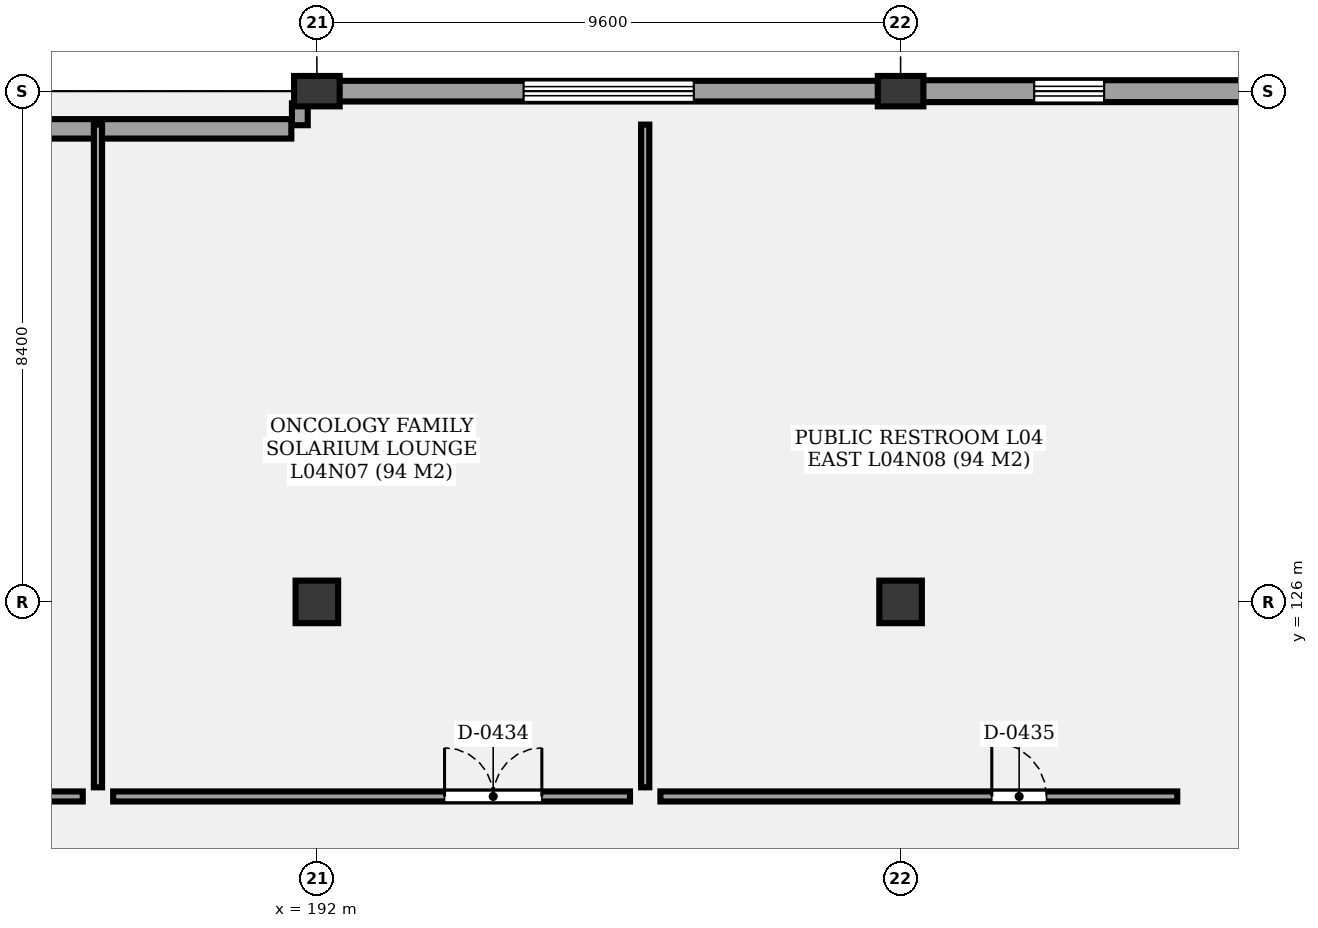
"""IFC4 building model, lengths in metres.
Left out: names, types, materials, properties, quantities, classifications, styles, units other than length and angle.
Written with IfcOpenShell. Run it as: python <this file> out.ifc"""

import sys

from ifc_helpers import new_model, si_unit, direction, frame, frame_2d, origin, origin_2d, place, context, subcontext, project, spatial, rectangle, extrude, element, fill, save


model = new_model("IFC4")
c1 = context("Model", 3, precision=1e-05, world=origin(), true_north=direction((0.0, 1.0)))
c2 = subcontext(c1, "Body", "Model", "MODEL_VIEW")
j1 = project(units=[si_unit("LENGTHUNIT", "METRE"), si_unit("PLANEANGLEUNIT", "RADIAN")], contexts=[c1])
p1 = place(None, origin())
s1 = spatial("IfcSite", under=j1, at=p1, CompositionType="ELEMENT")
p2 = place(p1, origin())
s2 = spatial("IfcBuilding", under=s1, at=p2, CompositionType="ELEMENT")
p3 = place(p2, frame((0.0, 0.0, 17.8)))
s3 = spatial("IfcBuildingStorey", under=s2, at=p3, CompositionType="ELEMENT", Elevation=17.8)
p4 = place(p3, frame((192.0, 126.0, 0.0), z_axis=(0.0, 0.0, 1.0), x_axis=(1.0, 0.0, 0.0)))
e1 = element("IfcColumn", 1, at=p4, inside=s3, PredefinedType="COLUMN", context=c2, shape_type="SweptSolid", body=[
    extrude(rectangle(XDim=0.7, YDim=0.7, at=origin_2d()), origin(), (0.0, 0.0, 1.0), 4.2),
])
p5 = place(p3, frame((192.0, 134.4, 0.0), z_axis=(0.0, 0.0, 1.0), x_axis=(1.0, 0.0, 0.0)))
e2 = element("IfcColumn", 2, at=p5, inside=s3, PredefinedType="COLUMN", context=c2, shape_type="SweptSolid", body=[
    extrude(rectangle(XDim=0.75, YDim=0.5, at=origin_2d()), origin(), (0.0, 0.0, 1.0), 4.2),
])
p6 = place(p3, frame((201.6, 126.0, 0.0), z_axis=(0.0, 0.0, 1.0), x_axis=(1.0, 0.0, 0.0)))
e3 = element("IfcColumn", 3, at=p6, inside=s3, PredefinedType="COLUMN", context=c2, shape_type="SweptSolid", body=[
    extrude(rectangle(XDim=0.7, YDim=0.7, at=origin_2d()), origin(), (0.0, 0.0, 1.0), 4.2),
])
p7 = place(p3, frame((201.6, 134.4, 0.0), z_axis=(0.0, 0.0, 1.0), x_axis=(1.0, 0.0, 0.0)))
e4 = element("IfcColumn", 4, at=p7, inside=s3, PredefinedType="COLUMN", context=c2, shape_type="SweptSolid", body=[
    extrude(rectangle(XDim=0.75, YDim=0.5, at=origin_2d()), origin(), (0.0, 0.0, 1.0), 4.2),
])
p8 = place(p3, frame((191.72, 134.2, 0.0), z_axis=(0.0, 0.0, 1.0), x_axis=(0.0, -1.0, 0.0)))
e5 = element("IfcWall", 5, at=p8, inside=s3, PredefinedType="SOLIDWALL", context=c2, shape_type="SweptSolid", body=[
    extrude(rectangle(XDim=0.36, YDim=0.26, at=frame_2d((0.18, 0.0))), origin(), (0.0, 0.0, 1.0), 3.39),
])
p9 = place(p3, frame((182.82, 133.78, 0.0), z_axis=(0.0, 0.0, 1.0), x_axis=(1.0, 0.0, 0.0)))
e6 = element("IfcWall", 6, at=p9, inside=s3, PredefinedType="SOLIDWALL", context=c2, shape_type="SweptSolid", body=[
    extrude(rectangle(XDim=8.76, YDim=0.32, at=frame_2d((4.38, 0.0))), origin(), (0.0, 0.0, 1.0), 3.39),
])
p10 = place(p3, frame((192.0, 134.4, 0.0), z_axis=(0.0, 0.0, 1.0), x_axis=(1.0, 0.0, 0.0)))
e7 = element("IfcWall", 7, at=p10, inside=s3, PredefinedType="SOLIDWALL", context=c2, shape_type="SweptSolid", body=[
    extrude(rectangle(XDim=9.6, YDim=0.34, at=frame_2d((4.8, 0.0))), origin(), (0.0, 0.0, 1.0), 3.39),
])
p11 = place(p10, frame((3.4, 0.0, 0.85)))
e8 = element("IfcOpeningElement", 8, at=p11, cuts=e7, PredefinedType="OPENING", context=c2, shape_type="SweptSolid", body=[
    extrude(rectangle(XDim=2.8, YDim=1.2, at=frame_2d((1.4, 0.6))), frame((0.0, 0.18, 0.0), z_axis=(0.0, -1.0, 0.0), x_axis=(1.0, 0.0, 0.0)), (0.0, 0.0, 1.0), 0.36),
])
p12 = place(p3, frame((201.6, 134.4, 0.0), z_axis=(0.0, 0.0, 1.0), x_axis=(1.0, 0.0, 0.0)))
e9 = element("IfcWall", 9, at=p12, inside=s3, PredefinedType="SOLIDWALL", context=c2, shape_type="SweptSolid", body=[
    extrude(rectangle(XDim=9.6, YDim=0.36, at=frame_2d((4.8, 0.0))), origin(), (0.0, 0.0, 1.0), 3.39),
])
p13 = place(p12, frame((2.197, 0.0, 0.85)))
e10 = element("IfcOpeningElement", 10, at=p13, cuts=e9, PredefinedType="OPENING", context=c2, shape_type="SweptSolid", body=[
    extrude(rectangle(XDim=1.15, YDim=1.4, at=frame_2d((0.575, 0.7))), frame((0.0, 0.19, 0.0), z_axis=(0.0, -1.0, 0.0), x_axis=(1.0, 0.0, 0.0)), (0.0, 0.0, 1.0), 0.38),
])
p14 = place(p12, frame((6.253, 0.0, 0.85)))
e11 = element("IfcOpeningElement", 11, at=p14, cuts=e9, PredefinedType="OPENING", context=c2, shape_type="SweptSolid", body=[
    extrude(rectangle(XDim=1.15, YDim=1.4, at=frame_2d((0.575, 0.7))), frame((0.0, 0.19, 0.0), z_axis=(0.0, -1.0, 0.0), x_axis=(1.0, 0.0, 0.0)), (0.0, 0.0, 1.0), 0.38),
])
p15 = place(p3, frame((179.65, 122.8, 0.0), z_axis=(0.0, 0.0, 1.0), x_axis=(1.0, 0.0, 0.0)))
e12 = element("IfcWall", 12, at=p15, inside=s3, PredefinedType="PARTITIONING", context=c2, shape_type="SweptSolid", body=[
    extrude(rectangle(XDim=8.5, YDim=0.165, at=frame_2d((4.25, 0.0))), origin(), (0.0, 0.0, 1.0), 3.3),
])
p16 = place(p15, frame((5.45, 0.0, 0.0)))
e13 = element("IfcOpeningElement", 13, at=p16, cuts=e12, PredefinedType="OPENING", context=c2, shape_type="SweptSolid", body=[
    extrude(rectangle(XDim=0.9, YDim=2.1, at=frame_2d((0.45, 1.05))), frame((0.0, 0.093, 0.0), z_axis=(0.0, -1.0, 0.0), x_axis=(1.0, 0.0, 0.0)), (0.0, 0.0, 1.0), 0.185),
])
p17 = place(p3, frame((188.65, 122.8, 0.0), z_axis=(0.0, 0.0, 1.0), x_axis=(1.0, 0.0, 0.0)))
e14 = element("IfcWall", 14, at=p17, inside=s3, PredefinedType="PARTITIONING", context=c2, shape_type="SweptSolid", body=[
    extrude(rectangle(XDim=8.5, YDim=0.165, at=frame_2d((4.25, 0.0))), origin(), (0.0, 0.0, 1.0), 3.3),
])
p18 = place(p17, frame((5.45, 0.0, 0.0)))
e15 = element("IfcOpeningElement", 15, at=p18, cuts=e14, PredefinedType="OPENING", context=c2, shape_type="SweptSolid", body=[
    extrude(rectangle(XDim=1.6, YDim=2.2, at=frame_2d((0.8, 1.1))), frame((0.0, 0.093, 0.0), z_axis=(0.0, -1.0, 0.0), x_axis=(1.0, 0.0, 0.0)), (0.0, 0.0, 1.0), 0.185),
])
p19 = place(p3, frame((188.4, 122.95, 0.0), z_axis=(0.0, 0.0, 1.0), x_axis=(0.0, 1.0, 0.0)))
e16 = element("IfcWall", 16, at=p19, inside=s3, PredefinedType="PARTITIONING", context=c2, shape_type="SweptSolid", body=[
    extrude(rectangle(XDim=10.9, YDim=0.135, at=frame_2d((5.45, 0.0))), origin(), (0.0, 0.0, 1.0), 3.3),
])
p20 = place(p3, frame((197.65, 122.8, 0.0), z_axis=(0.0, 0.0, 1.0), x_axis=(1.0, 0.0, 0.0)))
e17 = element("IfcWall", 17, at=p20, inside=s3, PredefinedType="PARTITIONING", context=c2, shape_type="SweptSolid", body=[
    extrude(rectangle(XDim=8.5, YDim=0.165, at=frame_2d((4.25, 0.0))), origin(), (0.0, 0.0, 1.0), 3.3),
])
p21 = place(p20, frame((5.45, 0.0, 0.0)))
e18 = element("IfcOpeningElement", 18, at=p21, cuts=e17, PredefinedType="OPENING", context=c2, shape_type="SweptSolid", body=[
    extrude(rectangle(XDim=0.9, YDim=2.1, at=frame_2d((0.45, 1.05))), frame((0.0, 0.093, 0.0), z_axis=(0.0, -1.0, 0.0), x_axis=(1.0, 0.0, 0.0)), (0.0, 0.0, 1.0), 0.185),
])
p22 = place(p3, frame((197.4, 122.95, 0.0), z_axis=(0.0, 0.0, 1.0), x_axis=(0.0, 1.0, 0.0)))
e19 = element("IfcWall", 19, at=p22, inside=s3, PredefinedType="PARTITIONING", context=c2, shape_type="SweptSolid", body=[
    extrude(rectangle(XDim=10.9, YDim=0.135, at=frame_2d((5.45, 0.0))), origin(), (0.0, 0.0, 1.0), 3.3),
])
p23 = place(p11, origin())
e20 = element("IfcWindow", 20, at=p23, inside=s3, PartitioningType="SINGLE_PANEL", PredefinedType="WINDOW", context=c2, shape_type="SweptSolid", body=[
    extrude(rectangle(XDim=2.8, YDim=1.2, at=frame_2d((1.4, 0.6))), frame((0.0, 0.03, 0.0), z_axis=(0.0, -1.0, 0.0), x_axis=(1.0, 0.0, 0.0)), (0.0, 0.0, 1.0), 0.06),
])
fill(e8, e20)
p24 = place(p13, origin())
e21 = element("IfcWindow", 21, at=p24, inside=s3, PartitioningType="SINGLE_PANEL", PredefinedType="WINDOW", context=c2, shape_type="SweptSolid", body=[
    extrude(rectangle(XDim=1.15, YDim=1.4, at=frame_2d((0.575, 0.7))), frame((0.0, 0.03, 0.0), z_axis=(0.0, -1.0, 0.0), x_axis=(1.0, 0.0, 0.0)), (0.0, 0.0, 1.0), 0.06),
])
fill(e10, e21)
p25 = place(p18, origin())
e22 = element("IfcDoor", 22, at=p25, inside=s3, OperationType="DOUBLE_DOOR_SINGLE_SWING", PredefinedType="DOOR", context=c2, shape_type="SweptSolid", body=[
    extrude(rectangle(XDim=1.6, YDim=2.2, at=frame_2d((0.8, 1.1))), frame((0.0, 0.025, 0.0), z_axis=(0.0, -1.0, 0.0), x_axis=(1.0, 0.0, 0.0)), (0.0, 0.0, 1.0), 0.05),
])
fill(e15, e22)
p26 = place(p21, origin())
e23 = element("IfcDoor", 23, at=p26, inside=s3, OperationType="SINGLE_SWING_LEFT", PredefinedType="DOOR", context=c2, shape_type="SweptSolid", body=[
    extrude(rectangle(XDim=0.9, YDim=2.1, at=frame_2d((0.45, 1.05))), frame((0.0, 0.025, 0.0), z_axis=(0.0, -1.0, 0.0), x_axis=(1.0, 0.0, 0.0)), (0.0, 0.0, 1.0), 0.05),
])
fill(e18, e23)
save(model, sys.argv[1])
